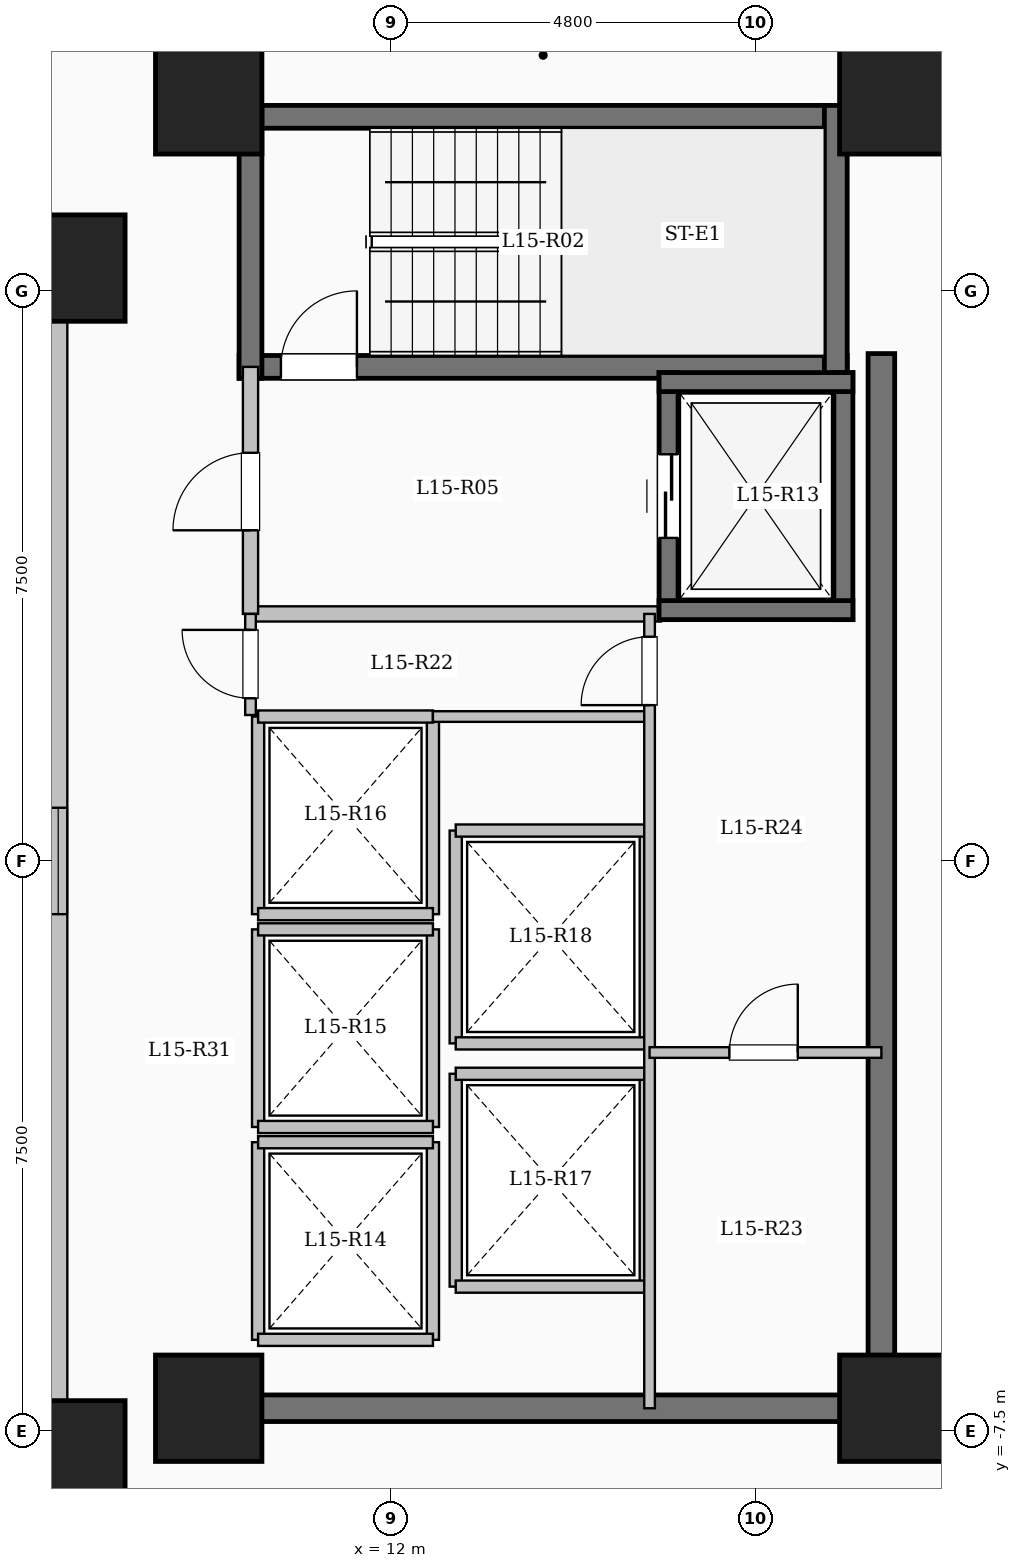
"""IFC4 building model, lengths in metres.
Left out: names, types, materials, properties, quantities, classifications, styles, units other than length and angle.
Written with IfcOpenShell. Run it as: python <this file> out.ifc"""

import sys

from ifc_helpers import new_model, si_unit, direction, frame, frame_2d, origin, origin_2d, place, context, subcontext, project, spatial, rectangle, extrude, element, fill, save


model = new_model("IFC4")
c1 = context("Model", 3, precision=1e-05, world=origin(), true_north=direction((0.0, 1.0)))
c2 = subcontext(c1, "Body", "Model", "MODEL_VIEW")
j1 = project(units=[si_unit("LENGTHUNIT", "METRE"), si_unit("PLANEANGLEUNIT", "RADIAN")], contexts=[c1])
p1 = place(None, origin())
s1 = spatial("IfcSite", under=j1, at=p1, CompositionType="ELEMENT")
p2 = place(p1, origin())
s2 = spatial("IfcBuilding", under=s1, at=p2, CompositionType="ELEMENT")
p3 = place(p2, frame((0.0, 0.0, 57.5)))
s3 = spatial("IfcBuildingStorey", under=s2, at=p3, CompositionType="ELEMENT", Elevation=57.5)
for number, where, z_axis, x_axis in (
    (1, (7.8, -7.8, 0.0), (0.0, 0.0, 1.0), (1.0, 0.0, 0.0)),
    (2, (7.8, 7.8, 0.0), (0.0, 0.0, 1.0), (1.0, 0.0, 0.0)),
    (3, (9.6, -7.2, 0.0), (0.0, 0.0, 1.0), (1.0, 0.0, 0.0)),
    (4, (9.6, 10.0, 0.0), (0.0, 0.0, 1.0), (1.0, 0.0, 0.0)),
    (5, (18.6, -7.2, 0.0), (0.0, 0.0, 1.0), (1.0, 0.0, 0.0)),
    (6, (18.6, 10.0, 0.0), (0.0, 0.0, 1.0), (1.0, 0.0, 0.0)),
):
    element("IfcColumn", number, at=place(p3, frame(where, z_axis=z_axis, x_axis=x_axis)), inside=s3, PredefinedType="COLUMN", context=c2, shape_type="SweptSolid", body=[
        extrude(rectangle(XDim=1.4, YDim=1.4, at=origin_2d()), origin(), (0.0, 0.0, 1.0), 3.35),
    ])
p4 = place(p3, frame((-7.62, -7.62, 0.0), z_axis=(0.0, 0.0, 1.0), x_axis=(1.0, 0.0, 0.0)))
e7 = element("IfcWall", 7, at=p4, inside=s3, PredefinedType="SOLIDWALL", context=c2, shape_type="SweptSolid", body=[
    extrude(rectangle(XDim=15.24, YDim=0.24, at=frame_2d((7.62, 0.0))), origin(), (0.0, 0.0, 1.0), 3.1),
])
p5 = place(p4, frame((6.92, 0.0, 0.95)))
e8 = element("IfcOpeningElement", 8, at=p5, cuts=e7, PredefinedType="OPENING", context=c2, shape_type="SweptSolid", body=[
    extrude(rectangle(XDim=1.4, YDim=1.5, at=frame_2d((0.7, 0.75))), frame((0.0, 0.13, 0.0), z_axis=(0.0, -1.0, 0.0), x_axis=(1.0, 0.0, 0.0)), (0.0, 0.0, 1.0), 0.26),
])
p6 = place(p3, frame((7.62, -7.62, 0.0), z_axis=(0.0, 0.0, 1.0), x_axis=(0.0, 1.0, 0.0)))
e9 = element("IfcWall", 9, at=p6, inside=s3, PredefinedType="SOLIDWALL", context=c2, shape_type="SweptSolid", body=[
    extrude(rectangle(XDim=15.24, YDim=0.24, at=frame_2d((7.62, 0.0))), origin(), (0.0, 0.0, 1.0), 3.1),
])
p7 = place(p6, frame((6.92, 0.0, 0.95)))
e10 = element("IfcOpeningElement", 10, at=p7, cuts=e9, PredefinedType="OPENING", context=c2, shape_type="SweptSolid", body=[
    extrude(rectangle(XDim=1.4, YDim=1.5, at=frame_2d((0.7, 0.75))), frame((0.0, 0.13, 0.0), z_axis=(0.0, -1.0, 0.0), x_axis=(1.0, 0.0, 0.0)), (0.0, 0.0, 1.0), 0.26),
])
p8 = place(p3, frame((7.62, 7.62, 0.0), z_axis=(0.0, 0.0, 1.0), x_axis=(-1.0, 0.0, 0.0)))
e11 = element("IfcWall", 11, at=p8, inside=s3, PredefinedType="SOLIDWALL", context=c2, shape_type="SweptSolid", body=[
    extrude(rectangle(XDim=15.24, YDim=0.24, at=frame_2d((7.62, 0.0))), origin(), (0.0, 0.0, 1.0), 3.1),
])
p9 = place(p8, frame((6.92, 0.0, 0.95)))
e12 = element("IfcOpeningElement", 12, at=p9, cuts=e11, PredefinedType="OPENING", context=c2, shape_type="SweptSolid", body=[
    extrude(rectangle(XDim=1.4, YDim=1.5, at=frame_2d((0.7, 0.75))), frame((0.0, 0.13, 0.0), z_axis=(0.0, -1.0, 0.0), x_axis=(1.0, 0.0, 0.0)), (0.0, 0.0, 1.0), 0.26),
])
p10 = place(p3, frame((10.0, 9.79, 0.0), z_axis=(0.0, 0.0, 1.0), x_axis=(1.0, 0.0, 0.0)))
e13 = element("IfcWall", 13, at=p10, inside=s3, PredefinedType="SHEAR", context=c2, shape_type="SweptSolid", body=[
    extrude(rectangle(XDim=8.0, YDim=0.3, at=frame_2d((4.0, 0.0))), origin(), (0.0, 0.0, 1.0), 3.35),
])
p11 = place(p3, frame((10.0, 6.5, 0.0), z_axis=(0.0, 0.0, 1.0), x_axis=(1.0, 0.0, 0.0)))
e14 = element("IfcWall", 14, at=p11, inside=s3, PredefinedType="SHEAR", context=c2, shape_type="SweptSolid", body=[
    extrude(rectangle(XDim=8.0, YDim=0.3, at=frame_2d((4.0, 0.0))), origin(), (0.0, 0.0, 1.0), 3.35),
])
p12 = place(p11, frame((0.55, 0.0, 0.0)))
e15 = element("IfcOpeningElement", 15, at=p12, cuts=e14, PredefinedType="OPENING", context=c2, shape_type="SweptSolid", body=[
    extrude(rectangle(XDim=1.0, YDim=2.15, at=frame_2d((0.5, 1.075))), frame((0.0, 0.16, 0.0), z_axis=(0.0, -1.0, 0.0), x_axis=(1.0, 0.0, 0.0)), (0.0, 0.0, 1.0), 0.32),
])
for number, where, z_axis, x_axis in (
    (16, (10.15, 6.35, 0.0), (0.0, 0.0, 1.0), (0.0, 1.0, 0.0)),
    (17, (17.85, 6.35, 0.0), (0.0, 0.0, 1.0), (0.0, 1.0, 0.0)),
):
    element("IfcWall", number, at=place(p3, frame(where, z_axis=z_axis, x_axis=x_axis)), inside=s3, PredefinedType="SHEAR", context=c2, shape_type="SweptSolid", body=[
        extrude(rectangle(XDim=3.59, YDim=0.3, at=frame_2d((1.795, 0.0))), origin(), (0.0, 0.0, 1.0), 3.35),
    ])
p13 = place(p3, frame((10.15, 3.25, 0.0), z_axis=(0.0, 0.0, 1.0), x_axis=(1.0, 0.0, 0.0)))
e18 = element("IfcWall", 18, at=p13, inside=s3, PredefinedType="SOLIDWALL", context=c2, shape_type="SweptSolid", body=[
    extrude(rectangle(XDim=5.4, YDim=0.2, at=frame_2d((2.7, 0.0))), origin(), (0.0, 0.0, 1.0), 3.1),
])
p14 = place(p3, frame((10.15, 3.25, 0.0), z_axis=(0.0, 0.0, 1.0), x_axis=(0.0, 1.0, 0.0)))
e19 = element("IfcWall", 19, at=p14, inside=s3, PredefinedType="SOLIDWALL", context=c2, shape_type="SweptSolid", body=[
    extrude(rectangle(XDim=3.25, YDim=0.2, at=frame_2d((1.625, 0.0))), origin(), (0.0, 0.0, 1.0), 3.1),
])
p15 = place(p14, frame((1.1, 0.0, 0.0)))
e20 = element("IfcOpeningElement", 20, at=p15, cuts=e19, PredefinedType="OPENING", context=c2, shape_type="SweptSolid", body=[
    extrude(rectangle(XDim=1.02, YDim=2.15, at=frame_2d((0.51, 1.075))), frame((0.0, 0.11, 0.0), z_axis=(0.0, -1.0, 0.0), x_axis=(1.0, 0.0, 0.0)), (0.0, 0.0, 1.0), 0.22),
])
p16 = place(p3, frame((15.65, 3.175, 0.0), z_axis=(0.0, 0.0, 1.0), x_axis=(0.0, 1.0, 0.0)))
e21 = element("IfcWall", 21, at=p16, inside=s3, PredefinedType="SHEAR", context=c2, shape_type="SweptSolid", body=[
    extrude(rectangle(XDim=3.25, YDim=0.25, at=frame_2d((1.625, 0.0))), origin(), (0.0, 0.0, 1.0), 3.35),
])
p17 = place(p16, frame((1.075, 0.0, 0.0)))
e22 = element("IfcOpeningElement", 22, at=p17, cuts=e21, PredefinedType="OPENING", context=c2, shape_type="SweptSolid", body=[
    extrude(rectangle(XDim=1.1, YDim=2.15, at=frame_2d((0.55, 1.075))), frame((0.0, 0.135, 0.0), z_axis=(0.0, -1.0, 0.0), x_axis=(1.0, 0.0, 0.0)), (0.0, 0.0, 1.0), 0.27),
])
p18 = place(p3, frame((17.95, 3.175, 0.0), z_axis=(0.0, 0.0, 1.0), x_axis=(0.0, 1.0, 0.0)))
e23 = element("IfcWall", 23, at=p18, inside=s3, PredefinedType="SHEAR", context=c2, shape_type="SweptSolid", body=[
    extrude(rectangle(XDim=3.25, YDim=0.25, at=frame_2d((1.625, 0.0))), origin(), (0.0, 0.0, 1.0), 3.35),
])
for number, where, z_axis, x_axis in (
    (24, (15.525, 3.3, 0.0), (0.0, 0.0, 1.0), (1.0, 0.0, 0.0)),
    (25, (15.525, 6.3, 0.0), (0.0, 0.0, 1.0), (1.0, 0.0, 0.0)),
):
    element("IfcWall", number, at=place(p3, frame(where, z_axis=z_axis, x_axis=x_axis)), inside=s3, PredefinedType="SHEAR", context=c2, shape_type="SweptSolid", body=[
        extrude(rectangle(XDim=2.55, YDim=0.25, at=frame_2d((1.275, 0.0))), origin(), (0.0, 0.0, 1.0), 3.35),
    ])
for number, where, z_axis, x_axis in (
    (26, (10.25, -6.3, 0.0), (0.0, 0.0, 1.0), (0.0, 1.0, 0.0)),
    (27, (12.55, -6.3, 0.0), (0.0, 0.0, 1.0), (0.0, 1.0, 0.0)),
):
    element("IfcWall", number, at=place(p3, frame(where, z_axis=z_axis, x_axis=x_axis)), inside=s3, PredefinedType="SOLIDWALL", context=c2, shape_type="SweptSolid", body=[
        extrude(rectangle(XDim=2.6, YDim=0.16, at=frame_2d((1.3, 0.0))), origin(), (0.0, 0.0, 1.0), 3.1),
    ])
for number, where, z_axis, x_axis in (
    (28, (10.25, -6.3, 0.0), (0.0, 0.0, 1.0), (1.0, 0.0, 0.0)),
    (29, (10.25, -3.7, 0.0), (0.0, 0.0, 1.0), (1.0, 0.0, 0.0)),
):
    element("IfcWall", number, at=place(p3, frame(where, z_axis=z_axis, x_axis=x_axis)), inside=s3, PredefinedType="SOLIDWALL", context=c2, shape_type="SweptSolid", body=[
        extrude(rectangle(XDim=2.3, YDim=0.16, at=frame_2d((1.15, 0.0))), origin(), (0.0, 0.0, 1.0), 3.1),
    ])
for number, where, z_axis, x_axis in (
    (30, (10.25, -3.5, 0.0), (0.0, 0.0, 1.0), (0.0, 1.0, 0.0)),
    (31, (12.55, -3.5, 0.0), (0.0, 0.0, 1.0), (0.0, 1.0, 0.0)),
):
    element("IfcWall", number, at=place(p3, frame(where, z_axis=z_axis, x_axis=x_axis)), inside=s3, PredefinedType="SOLIDWALL", context=c2, shape_type="SweptSolid", body=[
        extrude(rectangle(XDim=2.6, YDim=0.16, at=frame_2d((1.3, 0.0))), origin(), (0.0, 0.0, 1.0), 3.1),
    ])
for number, where, z_axis, x_axis in (
    (32, (10.25, -3.5, 0.0), (0.0, 0.0, 1.0), (1.0, 0.0, 0.0)),
    (33, (10.25, -0.9, 0.0), (0.0, 0.0, 1.0), (1.0, 0.0, 0.0)),
):
    element("IfcWall", number, at=place(p3, frame(where, z_axis=z_axis, x_axis=x_axis)), inside=s3, PredefinedType="SOLIDWALL", context=c2, shape_type="SweptSolid", body=[
        extrude(rectangle(XDim=2.3, YDim=0.16, at=frame_2d((1.15, 0.0))), origin(), (0.0, 0.0, 1.0), 3.1),
    ])
for number, where, z_axis, x_axis in (
    (34, (10.25, -0.7, 0.0), (0.0, 0.0, 1.0), (0.0, 1.0, 0.0)),
    (35, (12.55, -0.7, 0.0), (0.0, 0.0, 1.0), (0.0, 1.0, 0.0)),
):
    element("IfcWall", number, at=place(p3, frame(where, z_axis=z_axis, x_axis=x_axis)), inside=s3, PredefinedType="SOLIDWALL", context=c2, shape_type="SweptSolid", body=[
        extrude(rectangle(XDim=2.6, YDim=0.16, at=frame_2d((1.3, 0.0))), origin(), (0.0, 0.0, 1.0), 3.1),
    ])
for number, where, z_axis, x_axis in (
    (36, (10.25, -0.7, 0.0), (0.0, 0.0, 1.0), (1.0, 0.0, 0.0)),
    (37, (10.25, 1.9, 0.0), (0.0, 0.0, 1.0), (1.0, 0.0, 0.0)),
):
    element("IfcWall", number, at=place(p3, frame(where, z_axis=z_axis, x_axis=x_axis)), inside=s3, PredefinedType="SOLIDWALL", context=c2, shape_type="SweptSolid", body=[
        extrude(rectangle(XDim=2.3, YDim=0.16, at=frame_2d((1.15, 0.0))), origin(), (0.0, 0.0, 1.0), 3.1),
    ])
for number, where, z_axis, x_axis in (
    (38, (12.85, -5.6, 0.0), (0.0, 0.0, 1.0), (0.0, 1.0, 0.0)),
    (39, (15.35, -5.6, 0.0), (0.0, 0.0, 1.0), (0.0, 1.0, 0.0)),
):
    element("IfcWall", number, at=place(p3, frame(where, z_axis=z_axis, x_axis=x_axis)), inside=s3, PredefinedType="SOLIDWALL", context=c2, shape_type="SweptSolid", body=[
        extrude(rectangle(XDim=2.8, YDim=0.16, at=frame_2d((1.4, 0.0))), origin(), (0.0, 0.0, 1.0), 3.1),
    ])
for number, where, z_axis, x_axis in (
    (40, (12.85, -5.6, 0.0), (0.0, 0.0, 1.0), (1.0, 0.0, 0.0)),
    (41, (12.85, -2.8, 0.0), (0.0, 0.0, 1.0), (1.0, 0.0, 0.0)),
):
    element("IfcWall", number, at=place(p3, frame(where, z_axis=z_axis, x_axis=x_axis)), inside=s3, PredefinedType="SOLIDWALL", context=c2, shape_type="SweptSolid", body=[
        extrude(rectangle(XDim=2.5, YDim=0.16, at=frame_2d((1.25, 0.0))), origin(), (0.0, 0.0, 1.0), 3.1),
    ])
for number, where, z_axis, x_axis in (
    (42, (12.85, -2.4, 0.0), (0.0, 0.0, 1.0), (0.0, 1.0, 0.0)),
    (43, (15.35, -2.4, 0.0), (0.0, 0.0, 1.0), (0.0, 1.0, 0.0)),
):
    element("IfcWall", number, at=place(p3, frame(where, z_axis=z_axis, x_axis=x_axis)), inside=s3, PredefinedType="SOLIDWALL", context=c2, shape_type="SweptSolid", body=[
        extrude(rectangle(XDim=2.8, YDim=0.16, at=frame_2d((1.4, 0.0))), origin(), (0.0, 0.0, 1.0), 3.1),
    ])
for number, where, z_axis, x_axis in (
    (44, (12.85, -2.4, 0.0), (0.0, 0.0, 1.0), (1.0, 0.0, 0.0)),
    (45, (12.85, 0.4, 0.0), (0.0, 0.0, 1.0), (1.0, 0.0, 0.0)),
):
    element("IfcWall", number, at=place(p3, frame(where, z_axis=z_axis, x_axis=x_axis)), inside=s3, PredefinedType="SOLIDWALL", context=c2, shape_type="SweptSolid", body=[
        extrude(rectangle(XDim=2.5, YDim=0.16, at=frame_2d((1.25, 0.0))), origin(), (0.0, 0.0, 1.0), 3.1),
    ])
p19 = place(p3, frame((18.45, -7.375, 0.0), z_axis=(0.0, 0.0, 1.0), x_axis=(0.0, 1.0, 0.0)))
e46 = element("IfcWall", 46, at=p19, inside=s3, PredefinedType="SHEAR", context=c2, shape_type="SweptSolid", body=[
    extrude(rectangle(XDim=14.05, YDim=0.35, at=frame_2d((7.025, 0.0))), origin(), (0.0, 0.0, 1.0), 3.35),
])
p20 = place(p3, frame((10.075, -7.2, 0.0), z_axis=(0.0, 0.0, 1.0), x_axis=(1.0, 0.0, 0.0)))
e47 = element("IfcWall", 47, at=p20, inside=s3, PredefinedType="SHEAR", context=c2, shape_type="SweptSolid", body=[
    extrude(rectangle(XDim=8.55, YDim=0.35, at=frame_2d((4.275, 0.0))), origin(), (0.0, 0.0, 1.0), 3.35),
])
p21 = place(p3, frame((12.55, 1.9, 0.0), z_axis=(0.0, 0.0, 1.0), x_axis=(1.0, 0.0, 0.0)))
e48 = element("IfcWall", 48, at=p21, inside=s3, PredefinedType="PARTITIONING", context=c2, shape_type="SweptSolid", body=[
    extrude(rectangle(XDim=2.85, YDim=0.14, at=frame_2d((1.425, 0.0))), origin(), (0.0, 0.0, 1.0), 3.1),
])
p22 = place(p3, frame((10.15, 1.92, 0.0), z_axis=(0.0, 0.0, 1.0), x_axis=(0.0, 1.0, 0.0)))
e49 = element("IfcWall", 49, at=p22, inside=s3, PredefinedType="PARTITIONING", context=c2, shape_type="SweptSolid", body=[
    extrude(rectangle(XDim=1.33, YDim=0.14, at=frame_2d((0.665, 0.0))), origin(), (0.0, 0.0, 1.0), 3.1),
])
p23 = place(p22, frame((0.22, 0.0, 0.0)))
e50 = element("IfcOpeningElement", 50, at=p23, cuts=e49, PredefinedType="OPENING", context=c2, shape_type="SweptSolid", body=[
    extrude(rectangle(XDim=0.9, YDim=2.08, at=frame_2d((0.45, 1.04))), frame((0.0, 0.08, 0.0), z_axis=(0.0, -1.0, 0.0), x_axis=(1.0, 0.0, 0.0)), (0.0, 0.0, 1.0), 0.16),
])
p24 = place(p3, frame((15.4, -7.2, 0.0), z_axis=(0.0, 0.0, 1.0), x_axis=(0.0, 1.0, 0.0)))
e51 = element("IfcWall", 51, at=p24, inside=s3, PredefinedType="PARTITIONING", context=c2, shape_type="SweptSolid", body=[
    extrude(rectangle(XDim=10.45, YDim=0.14, at=frame_2d((5.225, 0.0))), origin(), (0.0, 0.0, 1.0), 3.1),
])
p25 = place(p24, frame((9.25, 0.0, 0.0)))
e52 = element("IfcOpeningElement", 52, at=p25, cuts=e51, PredefinedType="OPENING", context=c2, shape_type="SweptSolid", body=[
    extrude(rectangle(XDim=0.9, YDim=2.08, at=frame_2d((0.45, 1.04))), frame((0.0, 0.08, 0.0), z_axis=(0.0, -1.0, 0.0), x_axis=(1.0, 0.0, 0.0)), (0.0, 0.0, 1.0), 0.16),
])
p26 = place(p3, frame((15.4, -2.52, 0.0), z_axis=(0.0, 0.0, 1.0), x_axis=(1.0, 0.0, 0.0)))
e53 = element("IfcWall", 53, at=p26, inside=s3, PredefinedType="PARTITIONING", context=c2, shape_type="SweptSolid", body=[
    extrude(rectangle(XDim=3.05, YDim=0.14, at=frame_2d((1.525, 0.0))), origin(), (0.0, 0.0, 1.0), 3.1),
])
p27 = place(p26, frame((1.05, 0.0, 0.0)))
e54 = element("IfcOpeningElement", 54, at=p27, cuts=e53, PredefinedType="OPENING", context=c2, shape_type="SweptSolid", body=[
    extrude(rectangle(XDim=0.9, YDim=2.08, at=frame_2d((0.45, 1.04))), frame((0.0, 0.08, 0.0), z_axis=(0.0, -1.0, 0.0), x_axis=(1.0, 0.0, 0.0)), (0.0, 0.0, 1.0), 0.16),
])
p28 = place(p7, origin())
e55 = element("IfcWindow", 55, at=p28, inside=s3, PartitioningType="SINGLE_PANEL", PredefinedType="WINDOW", context=c2, shape_type="SweptSolid", body=[
    extrude(rectangle(XDim=1.4, YDim=1.5, at=frame_2d((0.7, 0.75))), frame((0.0, 0.03, 0.0), z_axis=(0.0, -1.0, 0.0), x_axis=(1.0, 0.0, 0.0)), (0.0, 0.0, 1.0), 0.06),
])
fill(e10, e55)
p29 = place(p12, origin())
e56 = element("IfcDoor", 56, at=p29, inside=s3, OperationType="SINGLE_SWING_RIGHT", PredefinedType="DOOR", context=c2, shape_type="SweptSolid", body=[
    extrude(rectangle(XDim=1.0, YDim=2.15, at=frame_2d((0.5, 1.075))), frame((0.0, 0.025, 0.0), z_axis=(0.0, -1.0, 0.0), x_axis=(1.0, 0.0, 0.0)), (0.0, 0.0, 1.0), 0.05),
])
fill(e15, e56)
p30 = place(p15, origin())
e57 = element("IfcDoor", 57, at=p30, inside=s3, OperationType="SINGLE_SWING_LEFT", PredefinedType="DOOR", context=c2, shape_type="SweptSolid", body=[
    extrude(rectangle(XDim=1.02, YDim=2.15, at=frame_2d((0.51, 1.075))), frame((0.0, 0.025, 0.0), z_axis=(0.0, -1.0, 0.0), x_axis=(1.0, 0.0, 0.0)), (0.0, 0.0, 1.0), 0.05),
])
fill(e20, e57)
p31 = place(p17, origin())
e58 = element("IfcDoor", 58, at=p31, inside=s3, OperationType="SLIDING_TO_LEFT", PredefinedType="DOOR", context=c2, shape_type="SweptSolid", body=[
    extrude(rectangle(XDim=1.1, YDim=2.15, at=frame_2d((0.55, 1.075))), frame((0.0, 0.025, 0.0), z_axis=(0.0, -1.0, 0.0), x_axis=(1.0, 0.0, 0.0)), (0.0, 0.0, 1.0), 0.05),
])
fill(e22, e58)
p32 = place(p23, origin())
e59 = element("IfcDoor", 59, at=p32, inside=s3, OperationType="SINGLE_SWING_RIGHT", PredefinedType="DOOR", context=c2, shape_type="SweptSolid", body=[
    extrude(rectangle(XDim=0.9, YDim=2.08, at=frame_2d((0.45, 1.04))), frame((0.0, 0.025, 0.0), z_axis=(0.0, -1.0, 0.0), x_axis=(1.0, 0.0, 0.0)), (0.0, 0.0, 1.0), 0.05),
])
fill(e50, e59)
p33 = place(p25, origin())
e60 = element("IfcDoor", 60, at=p33, inside=s3, OperationType="SINGLE_SWING_LEFT", PredefinedType="DOOR", context=c2, shape_type="SweptSolid", body=[
    extrude(rectangle(XDim=0.9, YDim=2.08, at=frame_2d((0.45, 1.04))), frame((0.0, 0.025, 0.0), z_axis=(0.0, -1.0, 0.0), x_axis=(1.0, 0.0, 0.0)), (0.0, 0.0, 1.0), 0.05),
])
fill(e52, e60)
p34 = place(p27, origin())
e61 = element("IfcDoor", 61, at=p34, inside=s3, OperationType="SINGLE_SWING_RIGHT", PredefinedType="DOOR", context=c2, shape_type="SweptSolid", body=[
    extrude(rectangle(XDim=0.9, YDim=2.08, at=frame_2d((0.45, 1.04))), frame((0.0, 0.025, 0.0), z_axis=(0.0, -1.0, 0.0), x_axis=(1.0, 0.0, 0.0)), (0.0, 0.0, 1.0), 0.05),
])
fill(e54, e61)
save(model, sys.argv[1])
